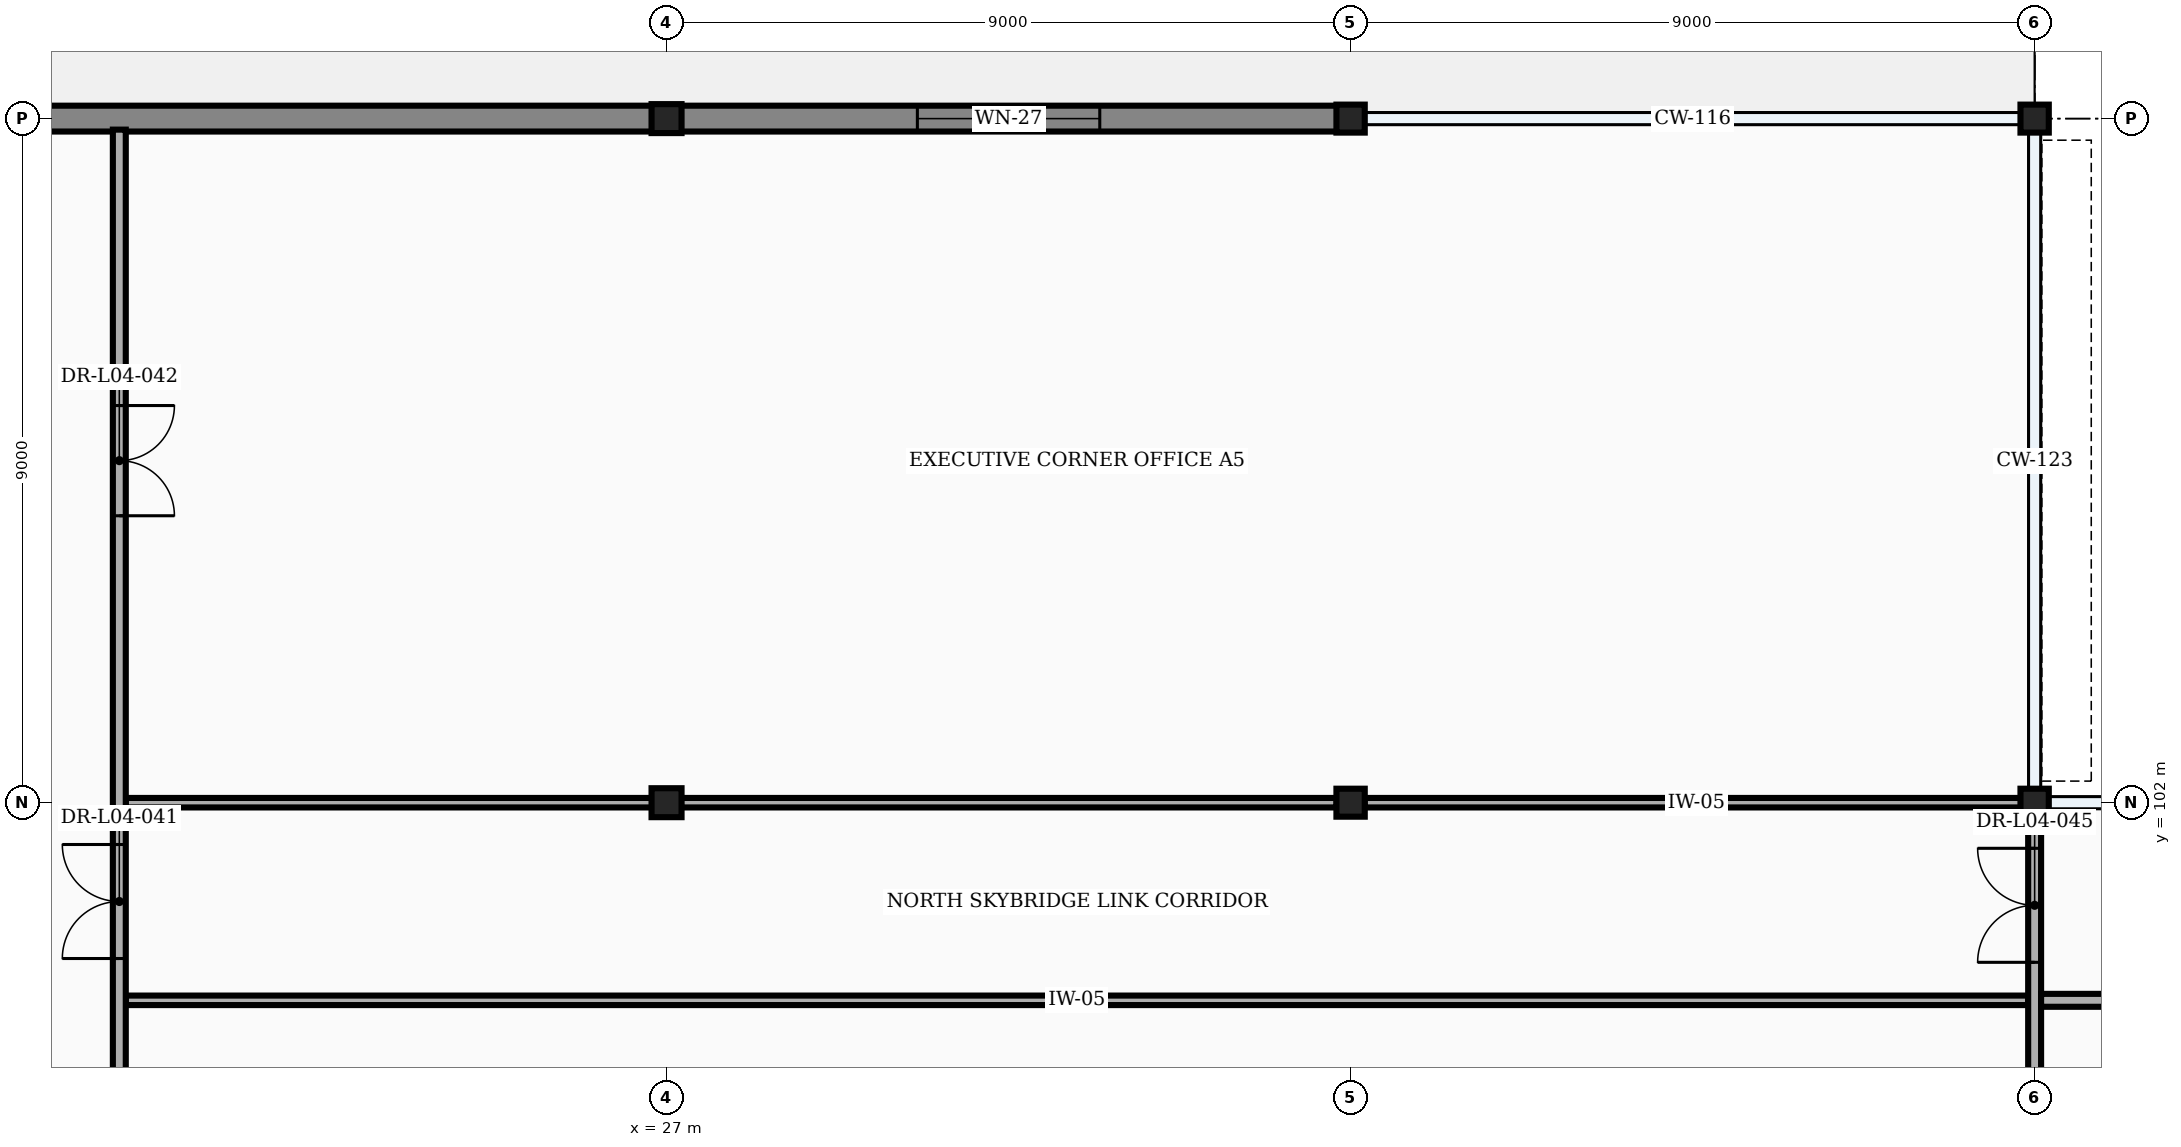
"""IFC4 building model, lengths in metres.
Left out: names, types, materials, properties, quantities, classifications, styles, units other than length and angle.
Written with IfcOpenShell. Run it as: python <this file> out.ifc"""

import sys

from ifc_helpers import new_model, si_unit, direction, frame, frame_2d, origin, origin_2d, place, context, subcontext, project, spatial, rectangle, i_section, extrude, element, fill, save


model = new_model("IFC4")
c1 = context("Model", 3, precision=1e-05, world=origin(), true_north=direction((0.0, 1.0)))
c2 = subcontext(c1, "Body", "Model", "MODEL_VIEW")
j1 = project(units=[si_unit("LENGTHUNIT", "METRE"), si_unit("PLANEANGLEUNIT", "RADIAN")], contexts=[c1])
p1 = place(None, origin())
s1 = spatial("IfcSite", under=j1, at=p1, CompositionType="ELEMENT")
p2 = place(p1, origin())
s2 = spatial("IfcBuilding", under=s1, at=p2, CompositionType="ELEMENT")
p3 = place(p2, frame((0.0, 0.0, 21.6)))
s3 = spatial("IfcBuildingStorey", under=s2, at=p3, CompositionType="ELEMENT", Elevation=21.6)
for number, where, z_axis, x_axis in (
    (1, (27.0, 102.0, 0.0), (0.0, 0.0, 1.0), (1.0, 0.0, 0.0)),
    (2, (27.0, 111.0, 0.0), (0.0, 0.0, 1.0), (1.0, 0.0, 0.0)),
):
    element("IfcColumn", number, at=place(p3, frame(where, z_axis=z_axis, x_axis=x_axis)), inside=s3, PredefinedType="COLUMN", context=c2, shape_type="SweptSolid", body=[
        extrude(i_section(OverallWidth=0.395, OverallDepth=0.381, WebThickness=0.018, FlangeThickness=0.03, at=origin_2d()), origin(), (0.0, 0.0, 1.0), 3.9),
    ])
for number, where, z_axis, x_axis in (
    (3, (36.0, 102.0, 0.0), (0.0, 0.0, 1.0), (1.0, 0.0, 0.0)),
    (4, (36.0, 111.0, 0.0), (0.0, 0.0, 1.0), (1.0, 0.0, 0.0)),
    (5, (45.0, 102.0, 0.0), (0.0, 0.0, 1.0), (1.0, 0.0, 0.0)),
    (6, (45.0, 111.0, 0.0), (0.0, 0.0, 1.0), (1.0, 0.0, 0.0)),
):
    element("IfcColumn", number, at=place(p3, frame(where, z_axis=z_axis, x_axis=x_axis)), inside=s3, PredefinedType="COLUMN", context=c2, shape_type="SweptSolid", body=[
        extrude(i_section(OverallWidth=0.373, OverallDepth=0.368, WebThickness=0.014, FlangeThickness=0.024, FilletRadius=0.015, at=origin_2d()), origin(), (0.0, 0.0, 1.0), 3.9),
    ])
p4 = place(p3, frame((9.01, 111.0, 0.0), z_axis=(0.0, 0.0, 1.0), x_axis=(1.0, 0.0, 0.0)))
e7 = element("IfcWall", 7, at=p4, inside=s3, PredefinedType="STANDARD", context=c2, shape_type="SweptSolid", body=[
    extrude(rectangle(XDim=17.98, YDim=0.34, at=frame_2d((8.99, 0.0))), origin(), (0.0, 0.0, 1.0), 3.245),
])
p5 = place(p4, frame((8.39, 0.0, 0.7)))
e8 = element("IfcOpeningElement", 8, at=p5, cuts=e7, PredefinedType="OPENING", context=c2, shape_type="SweptSolid", body=[
    extrude(rectangle(XDim=1.2, YDim=1.95, at=frame_2d((0.6, 0.975))), frame((0.0, 0.182, 0.0), z_axis=(0.0, -1.0, 0.0), x_axis=(1.0, 0.0, 0.0)), (0.0, 0.0, 1.0), 0.364),
])
p6 = place(p3, frame((27.01, 111.0, 0.0), z_axis=(0.0, 0.0, 1.0), x_axis=(1.0, 0.0, 0.0)))
e9 = element("IfcWall", 9, at=p6, inside=s3, PredefinedType="STANDARD", context=c2, shape_type="SweptSolid", body=[
    extrude(rectangle(XDim=8.98, YDim=0.34, at=frame_2d((4.49, 0.0))), origin(), (0.0, 0.0, 1.0), 3.585),
])
p7 = place(p6, frame((3.29, 0.0, 0.7)))
e10 = element("IfcOpeningElement", 10, at=p7, cuts=e9, PredefinedType="OPENING", context=c2, shape_type="SweptSolid", body=[
    extrude(rectangle(XDim=2.4, YDim=1.95, at=frame_2d((1.2, 0.975))), frame((0.0, 0.182, 0.0), z_axis=(0.0, -1.0, 0.0), x_axis=(1.0, 0.0, 0.0)), (0.0, 0.0, 1.0), 0.364),
])
p8 = place(p3, frame((19.885, 99.4, 0.0), z_axis=(0.0, 0.0, 1.0), x_axis=(1.0, 0.0, 0.0)))
e11 = element("IfcWall", 11, at=p8, inside=s3, PredefinedType="PARTITIONING", context=c2, shape_type="SweptSolid", body=[
    extrude(rectangle(XDim=25.03, YDim=0.125, at=frame_2d((12.515, 0.0))), origin(), (0.0, 0.0, 1.0), 3.585),
])
p9 = place(p3, frame((19.885, 102.0, 0.0), z_axis=(0.0, 0.0, 1.0), x_axis=(1.0, 0.0, 0.0)))
e12 = element("IfcWall", 12, at=p9, inside=s3, PredefinedType="PARTITIONING", context=c2, shape_type="SweptSolid", body=[
    extrude(rectangle(XDim=6.925, YDim=0.125, at=frame_2d((3.462, 0.0))), origin(), (0.0, 0.0, 1.0), 3.245),
])
p10 = place(p3, frame((27.19, 102.0, 0.0), z_axis=(0.0, 0.0, 1.0), x_axis=(1.0, 0.0, 0.0)))
e13 = element("IfcWall", 13, at=p10, inside=s3, PredefinedType="PARTITIONING", context=c2, shape_type="SweptSolid", body=[
    extrude(rectangle(XDim=8.625, YDim=0.125, at=frame_2d((4.313, 0.0))), origin(), (0.0, 0.0, 1.0), 3.085),
])
p11 = place(p3, frame((36.184, 102.0, 0.0), z_axis=(0.0, 0.0, 1.0), x_axis=(1.0, 0.0, 0.0)))
e14 = element("IfcWall", 14, at=p11, inside=s3, PredefinedType="PARTITIONING", context=c2, shape_type="SweptSolid", body=[
    extrude(rectangle(XDim=8.731, YDim=0.125, at=frame_2d((4.365, 0.0))), origin(), (0.0, 0.0, 1.0), 3.135),
])
p12 = place(p3, frame((19.8, 80.76, 0.0), z_axis=(0.0, 0.0, 1.0), x_axis=(0.0, 1.0, 0.0)))
e15 = element("IfcWall", 15, at=p12, inside=s3, PredefinedType="PARTITIONING", context=c2, shape_type="SweptSolid", body=[
    extrude(rectangle(XDim=30.095, YDim=0.17, at=frame_2d((15.047, 0.0))), origin(), (0.0, 0.0, 1.0), 3.585),
])
p13 = place(p12, frame((4.3, 0.0, 0.0)))
e16 = element("IfcOpeningElement", 16, at=p13, cuts=e15, PredefinedType="OPENING", context=c2, shape_type="SweptSolid", body=[
    extrude(rectangle(XDim=1.08, YDim=2.15, at=frame_2d((0.54, 1.075))), frame((0.0, 0.097, 0.0), z_axis=(0.0, -1.0, 0.0), x_axis=(1.0, 0.0, 0.0)), (0.0, 0.0, 1.0), 0.194),
])
p14 = place(p12, frame((19.19, 0.0, 0.0)))
e17 = element("IfcOpeningElement", 17, at=p14, cuts=e15, PredefinedType="OPENING", context=c2, shape_type="SweptSolid", body=[
    extrude(rectangle(XDim=1.5, YDim=2.2, at=frame_2d((0.75, 1.1))), frame((0.0, 0.097, 0.0), z_axis=(0.0, -1.0, 0.0), x_axis=(1.0, 0.0, 0.0)), (0.0, 0.0, 1.0), 0.194),
])
p15 = place(p12, frame((25.015, 0.0, 0.0)))
e18 = element("IfcOpeningElement", 18, at=p15, cuts=e15, PredefinedType="OPENING", context=c2, shape_type="SweptSolid", body=[
    extrude(rectangle(XDim=1.45, YDim=2.2, at=frame_2d((0.725, 1.1))), frame((0.0, 0.097, 0.0), z_axis=(0.0, -1.0, 0.0), x_axis=(1.0, 0.0, 0.0)), (0.0, 0.0, 1.0), 0.194),
])
p16 = place(p12, frame((14.588, 0.0, 0.0)))
e19 = element("IfcOpeningElement", 19, at=p16, cuts=e15, PredefinedType="OPENING", context=c2, shape_type="SweptSolid", body=[
    extrude(rectangle(XDim=0.92, YDim=2.15, at=frame_2d((0.46, 1.075))), frame((0.0, 0.097, 0.0), z_axis=(0.0, -1.0, 0.0), x_axis=(1.0, 0.0, 0.0)), (0.0, 0.0, 1.0), 0.194),
])
p17 = place(p3, frame((45.0, 93.22, 0.0), z_axis=(0.0, 0.0, 1.0), x_axis=(0.0, 1.0, 0.0)))
e20 = element("IfcWall", 20, at=p17, inside=s3, PredefinedType="PARTITIONING", context=c2, shape_type="SweptSolid", body=[
    extrude(rectangle(XDim=8.56, YDim=0.17, at=frame_2d((4.28, 0.0))), origin(), (0.0, 0.0, 1.0), 3.052),
])
p18 = place(p17, frame((6.68, 0.0, 0.0)))
e21 = element("IfcOpeningElement", 21, at=p18, cuts=e20, PredefinedType="OPENING", context=c2, shape_type="SweptSolid", body=[
    extrude(rectangle(XDim=1.5, YDim=2.2, at=frame_2d((0.75, 1.1))), frame((0.0, 0.097, 0.0), z_axis=(0.0, -1.0, 0.0), x_axis=(1.0, 0.0, 0.0)), (0.0, 0.0, 1.0), 0.194),
])
p19 = place(p3, frame((45.085, 99.4, 0.0), z_axis=(0.0, 0.0, 1.0), x_axis=(1.0, 0.0, 0.0)))
e22 = element("IfcWall", 22, at=p19, inside=s3, PredefinedType="PARTITIONING", context=c2, shape_type="SweptSolid", body=[
    extrude(rectangle(XDim=107.83, YDim=0.17, at=frame_2d((53.915, 0.0))), origin(), (0.0, 0.0, 1.0), 3.585),
])
p20 = place(p19, frame((3.8, 0.0, 0.0)))
e23 = element("IfcOpeningElement", 23, at=p20, cuts=e22, PredefinedType="OPENING", context=c2, shape_type="SweptSolid", body=[
    extrude(rectangle(XDim=1.15, YDim=2.15, at=frame_2d((0.575, 1.075))), frame((0.0, 0.097, 0.0), z_axis=(0.0, -1.0, 0.0), x_axis=(1.0, 0.0, 0.0)), (0.0, 0.0, 1.0), 0.194),
])
p21 = place(p19, frame((102.3, 0.0, 0.0)))
e24 = element("IfcOpeningElement", 24, at=p21, cuts=e22, PredefinedType="OPENING", context=c2, shape_type="SweptSolid", body=[
    extrude(rectangle(XDim=1.15, YDim=2.15, at=frame_2d((0.575, 1.075))), frame((0.0, 0.097, 0.0), z_axis=(0.0, -1.0, 0.0), x_axis=(1.0, 0.0, 0.0)), (0.0, 0.0, 1.0), 0.194),
])
p22 = place(p7, origin())
e25 = element("IfcWindow", 25, at=p22, inside=s3, PartitioningType="SINGLE_PANEL", PredefinedType="WINDOW", context=c2, shape_type="SweptSolid", body=[
    extrude(rectangle(XDim=2.4, YDim=1.95, at=frame_2d((1.2, 0.975))), frame((0.0, 0.03, 0.0), z_axis=(0.0, -1.0, 0.0), x_axis=(1.0, 0.0, 0.0)), (0.0, 0.0, 1.0), 0.06),
])
fill(e10, e25)
p23 = place(p14, origin())
e26 = element("IfcDoor", 26, at=p23, inside=s3, OperationType="DOUBLE_DOOR_SINGLE_SWING", PredefinedType="DOOR", context=c2, shape_type="SweptSolid", body=[
    extrude(rectangle(XDim=1.5, YDim=2.2, at=frame_2d((0.75, 1.1))), frame((0.0, 0.025, 0.0), z_axis=(0.0, -1.0, 0.0), x_axis=(1.0, 0.0, 0.0)), (0.0, 0.0, 1.0), 0.05),
])
fill(e17, e26)
p24 = place(p15, frame((1.45, 0.0, 0.0), z_axis=(0.0, 0.0, 1.0), x_axis=(-1.0, 0.0, 0.0)))
e27 = element("IfcDoor", 27, at=p24, inside=s3, OperationType="DOUBLE_DOOR_SINGLE_SWING", PredefinedType="DOOR", context=c2, shape_type="SweptSolid", body=[
    extrude(rectangle(XDim=1.45, YDim=2.2, at=frame_2d((0.725, 1.1))), frame((0.0, 0.025, 0.0), z_axis=(0.0, -1.0, 0.0), x_axis=(1.0, 0.0, 0.0)), (0.0, 0.0, 1.0), 0.05),
])
fill(e18, e27)
p25 = place(p18, origin())
e28 = element("IfcDoor", 28, at=p25, inside=s3, OperationType="DOUBLE_DOOR_SINGLE_SWING", PredefinedType="DOOR", context=c2, shape_type="SweptSolid", body=[
    extrude(rectangle(XDim=1.5, YDim=2.2, at=frame_2d((0.75, 1.1))), frame((0.0, 0.025, 0.0), z_axis=(0.0, -1.0, 0.0), x_axis=(1.0, 0.0, 0.0)), (0.0, 0.0, 1.0), 0.05),
])
fill(e21, e28)
save(model, sys.argv[1])
